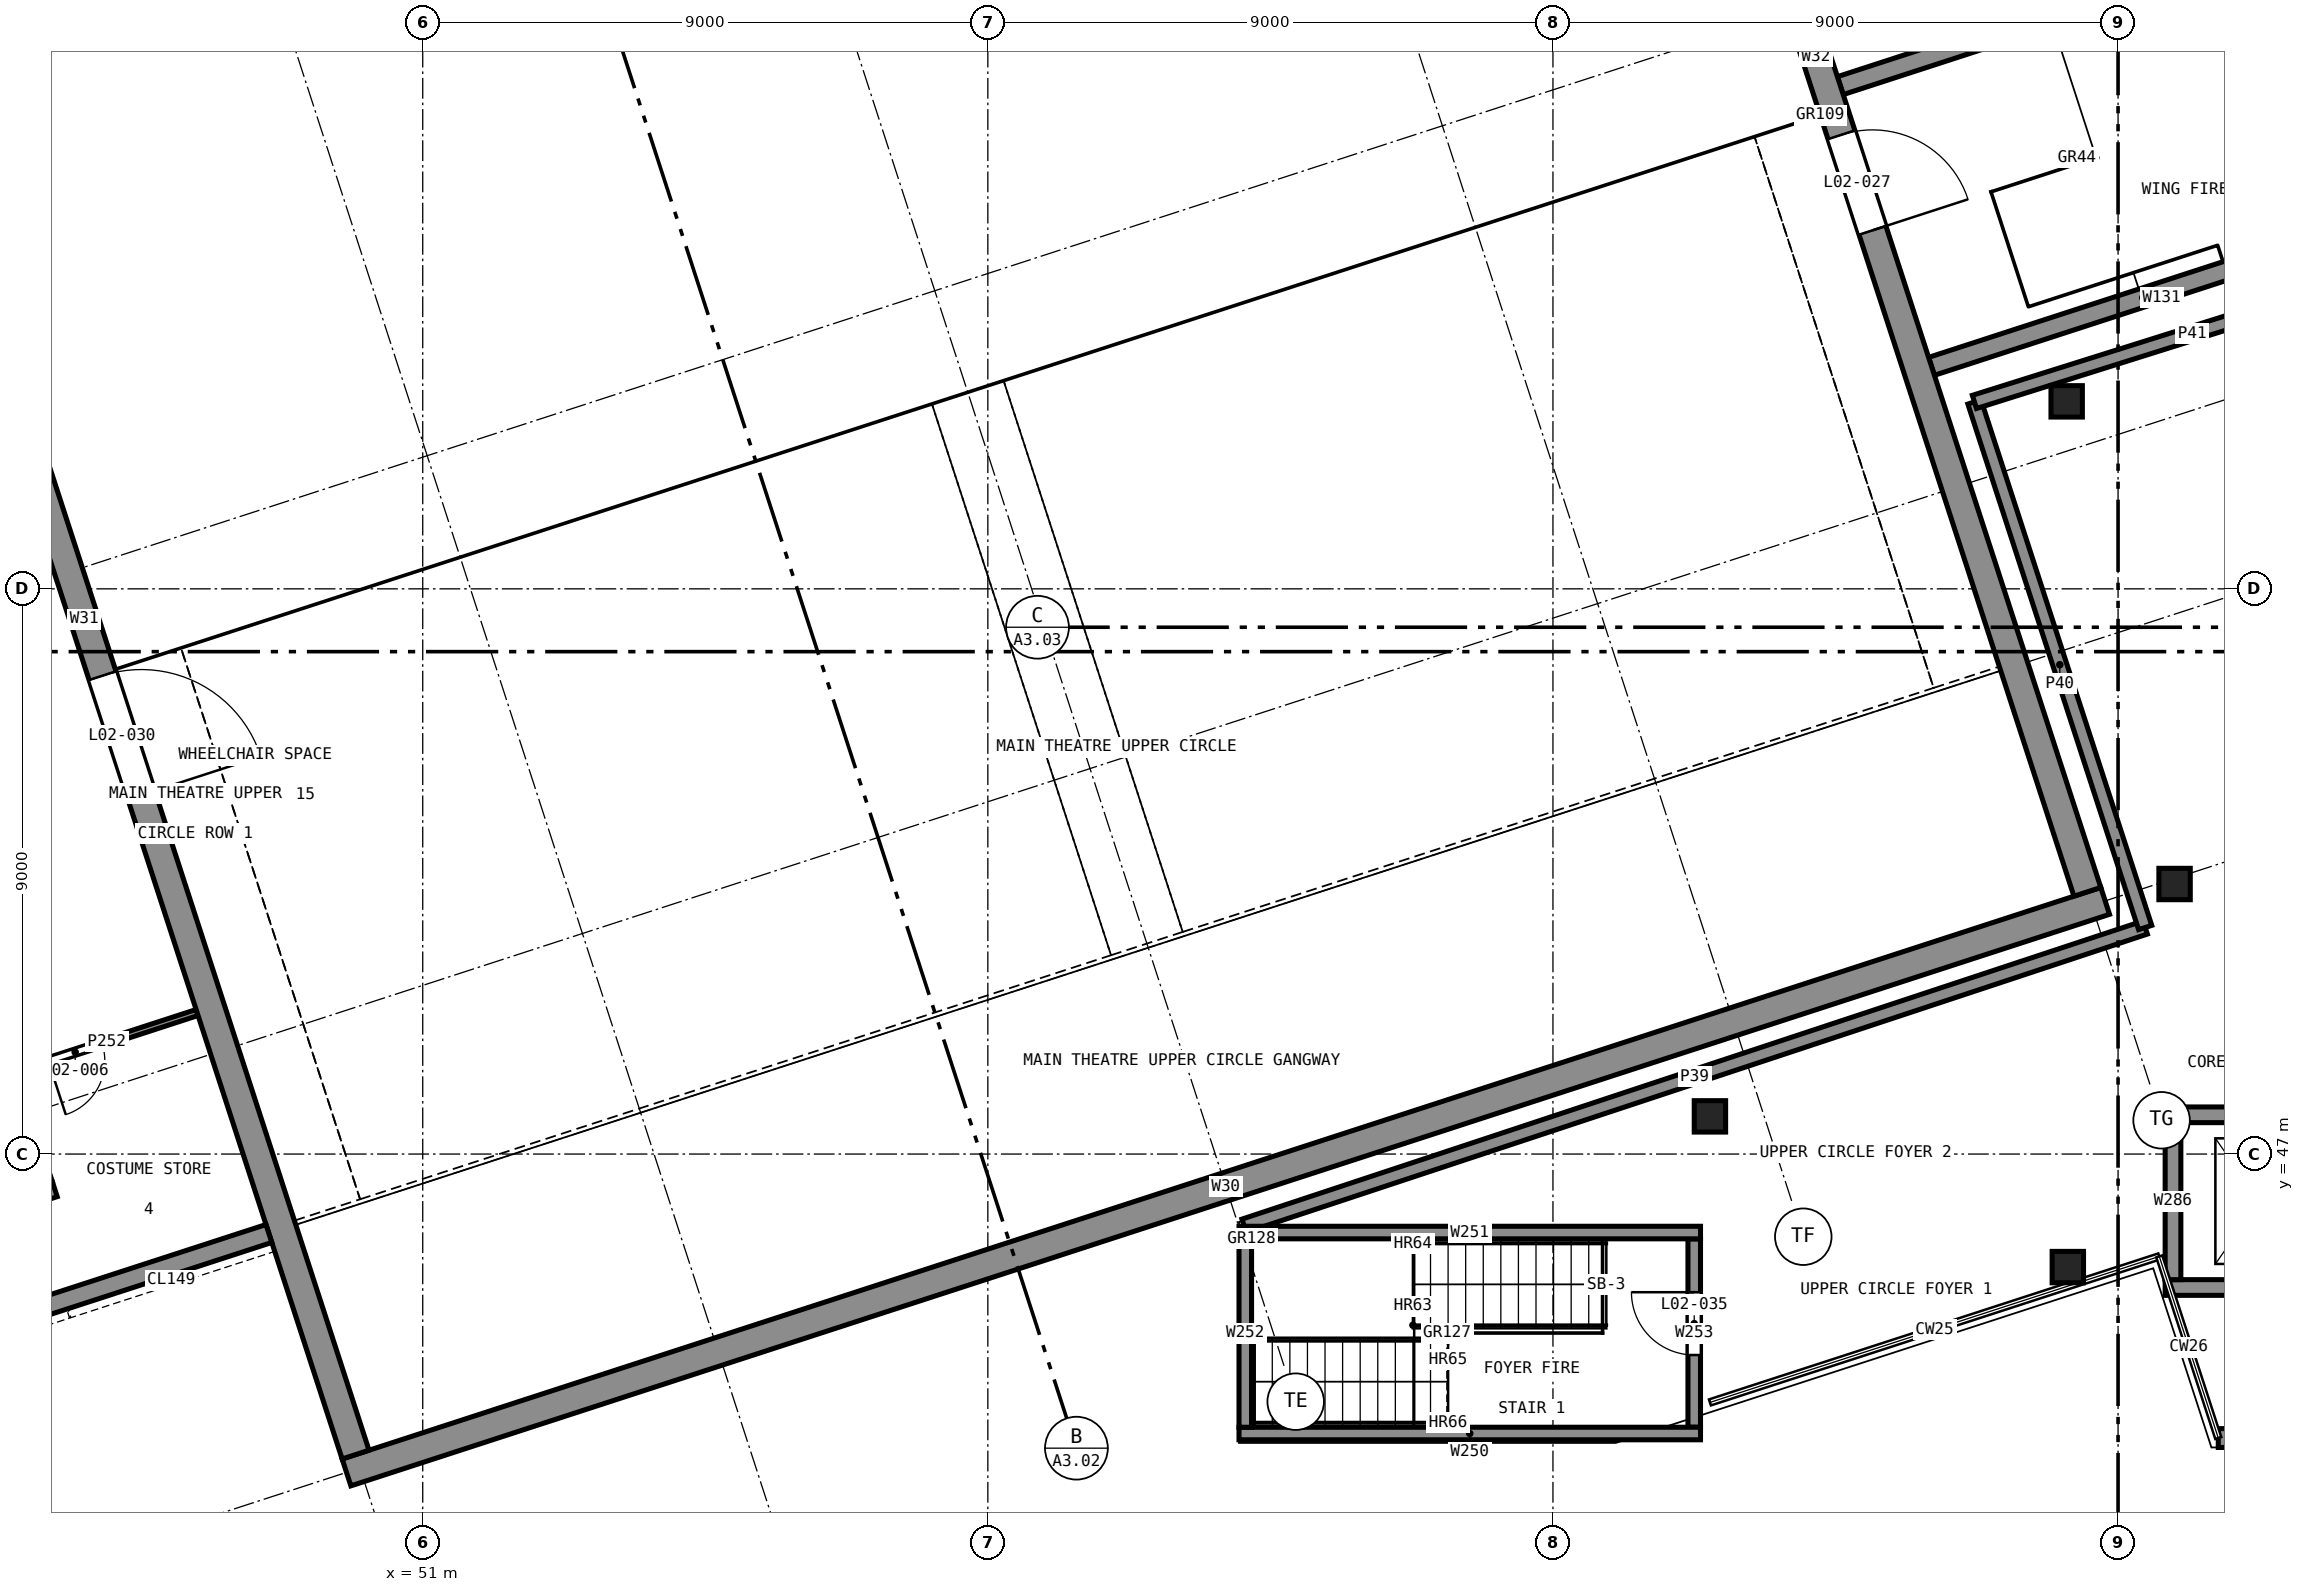
"""IFC4 building model, lengths in metres.
Left out: names, types, materials, properties, quantities, classifications, styles, units other than length and angle.
Written with IfcOpenShell. Run it as: python <this file> out.ifc"""

import sys

from ifc_helpers import new_model, si_unit, direction, frame, frame_2d, origin, origin_2d, place, context, subcontext, project, spatial, rectangle, extrude, element, fill, save


model = new_model("IFC4")
c1 = context("Model", 3, precision=1e-05, world=origin(), true_north=direction((0.0, 1.0)))
c2 = subcontext(c1, "Body", "Model", "MODEL_VIEW")
j1 = project(units=[si_unit("LENGTHUNIT", "METRE"), si_unit("PLANEANGLEUNIT", "RADIAN")], contexts=[c1])
p1 = place(None, origin())
s1 = spatial("IfcSite", under=j1, at=p1, CompositionType="ELEMENT")
p2 = place(p1, origin())
s2 = spatial("IfcBuilding", under=s1, at=p2, CompositionType="ELEMENT")
p3 = place(p2, frame((0.0, 0.0, 9.5)))
s3 = spatial("IfcBuildingStorey", under=s2, at=p3, CompositionType="ELEMENT", Elevation=9.5)
p4 = place(p3, frame((49.786, 41.93, 0.0), z_axis=(0.0, 0.0, 1.0), x_axis=(0.951055937194, 0.309018776661, 0.0)))
e1 = element("IfcWall", 1, at=p4, inside=s3, PredefinedType="SHEAR", context=c2, shape_type="SweptSolid", body=[
    extrude(rectangle(XDim=29.45, YDim=0.45, at=frame_2d((14.725, 0.0))), origin(), (0.0, 0.0, 1.0), 4.0),
])
p5 = place(p3, frame((49.93, 42.214, 0.0), z_axis=(0.0, 0.0, 1.0), x_axis=(-0.309016215614, 0.95105676933, 0.0)))
e2 = element("IfcWall", 2, at=p5, inside=s3, PredefinedType="SHEAR", context=c2, shape_type="SweptSolid", body=[
    extrude(rectangle(XDim=27.975, YDim=0.45, at=frame_2d((13.988, 0.0))), origin(), (0.0, 0.0, 1.0), 4.0),
])
p6 = place(p5, frame((11.042, 0.0, 0.0)))
e3 = element("IfcOpeningElement", 3, at=p6, cuts=e2, PredefinedType="OPENING", context=c2, shape_type="SweptSolid", body=[
    extrude(rectangle(XDim=2.0, YDim=2.4, at=frame_2d((1.0, 1.2))), frame((0.0, 0.235, 0.0), z_axis=(0.0, -1.0, 0.0), x_axis=(1.0, 0.0, 0.0)), (0.0, 0.0, 1.0), 0.47),
])
p7 = place(p3, frame((77.511, 51.176, 0.0), z_axis=(0.0, 0.0, 1.0), x_axis=(-0.309018780445, 0.951055935964, 0.0)))
e4 = element("IfcWall", 4, at=p7, inside=s3, PredefinedType="SHEAR", context=c2, shape_type="SweptSolid", body=[
    extrude(rectangle(XDim=27.975, YDim=0.45, at=frame_2d((13.987, 0.0))), origin(), (0.0, 0.0, 1.0), 4.0),
])
p8 = place(p7, frame((11.075, 0.0, 0.0)))
e5 = element("IfcOpeningElement", 5, at=p8, cuts=e4, PredefinedType="OPENING", context=c2, shape_type="SweptSolid", body=[
    extrude(rectangle(XDim=1.6, YDim=2.4, at=frame_2d((0.8, 1.2))), frame((0.0, 0.235, 0.0), z_axis=(0.0, -1.0, 0.0), x_axis=(1.0, 0.0, 0.0)), (0.0, 0.0, 1.0), 0.47),
])
p9 = place(p3, frame((48.55, 45.735, 0.0), z_axis=(0.0, 0.0, 1.0), x_axis=(-0.951061216338, -0.309002528757, 0.0)))
e6 = element("IfcWall", 6, at=p9, inside=s3, PredefinedType="SOLIDWALL", context=c2, shape_type="SweptSolid", body=[
    extrude(rectangle(XDim=15.925, YDim=0.3, at=frame_2d((7.962, 0.0))), origin(), (0.0, 0.0, 1.0), 4.0),
])
p10 = place(p3, frame((75.029, 59.543, 0.0), z_axis=(0.0, 0.0, 1.0), x_axis=(0.951057649576, 0.309013506475, 0.0)))
e7 = element("IfcWall", 7, at=p10, inside=s3, PredefinedType="SOLIDWALL", context=c2, shape_type="SweptSolid", body=[
    extrude(rectangle(XDim=7.075, YDim=0.3, at=frame_2d((3.538, 0.0))), origin(), (0.0, 0.0, 1.0), 3.7),
])
p11 = place(p3, frame((80.305, 66.199, 0.0), z_axis=(0.0, 0.0, 1.0), x_axis=(-0.951054354327, -0.309023648149, 0.0)))
e8 = element("IfcWall", 8, at=p11, inside=s3, PredefinedType="SOLIDWALL", context=c2, shape_type="SweptSolid", body=[
    extrude(rectangle(XDim=7.075, YDim=0.3, at=frame_2d((3.537, 0.0))), origin(), (0.0, 0.0, 1.0), 3.7),
])
p12 = place(p3, frame((42.382, 45.544, 0.0), z_axis=(0.0, 0.0, 1.0), x_axis=(0.951071801089, 0.308969948659, 0.0)))
e9 = element("IfcWall", 9, at=p12, inside=s3, PredefinedType="SHEAR", context=c2, shape_type="SweptSolid", body=[
    extrude(rectangle(XDim=2.9, YDim=0.25, at=frame_2d((1.45, 0.0))), origin(), (0.0, 0.0, 1.0), 4.0),
])
for number, where, z_axis, x_axis in (
    (10, (64.0, 42.55, 0.0), (0.0, 0.0, 1.0), (1.0, 0.0, 0.0)),
    (11, (71.35, 45.75, 0.0), (0.0, 0.0, 1.0), (-1.0, 0.0, 0.0)),
):
    element("IfcWall", number, at=place(p3, frame(where, z_axis=z_axis, x_axis=x_axis)), inside=s3, PredefinedType="SHEAR", context=c2, shape_type="SweptSolid", body=[
        extrude(rectangle(XDim=7.35, YDim=0.2, at=frame_2d((3.675, 0.0))), origin(), (0.0, 0.0, 1.0), 4.0),
    ])
p13 = place(p3, frame((64.1, 45.65, 0.0), z_axis=(0.0, 0.0, 1.0), x_axis=(0.0, -1.0, 0.0)))
e12 = element("IfcWall", 12, at=p13, inside=s3, PredefinedType="SHEAR", context=c2, shape_type="SweptSolid", body=[
    extrude(rectangle(XDim=3.0, YDim=0.2, at=frame_2d((1.5, 0.0))), origin(), (0.0, 0.0, 1.0), 4.0),
])
p14 = place(p3, frame((71.25, 42.65, 0.0), z_axis=(0.0, 0.0, 1.0), x_axis=(0.0, 1.0, 0.0)))
e13 = element("IfcWall", 13, at=p14, inside=s3, PredefinedType="SHEAR", context=c2, shape_type="SweptSolid", body=[
    extrude(rectangle(XDim=3.0, YDim=0.2, at=frame_2d((1.5, 0.0))), origin(), (0.0, 0.0, 1.0), 4.0),
])
p15 = place(p14, frame((1.15, 0.0, 0.0)))
e14 = element("IfcOpeningElement", 14, at=p15, cuts=e13, PredefinedType="OPENING", context=c2, shape_type="SweptSolid", body=[
    extrude(rectangle(XDim=1.0, YDim=2.1, at=frame_2d((0.5, 1.05))), frame((0.0, 0.11, 0.0), z_axis=(0.0, -1.0, 0.0), x_axis=(1.0, 0.0, 0.0)), (0.0, 0.0, 1.0), 0.22),
])
for number, where, z_axis, x_axis in (
    (15, (78.75, 44.875, 0.0), (0.0, 0.0, 1.0), (1.0, 0.0, 0.0)),
    (16, (81.75, 47.625, 0.0), (0.0, 0.0, 1.0), (-1.0, 0.0, 0.0)),
):
    element("IfcWall", number, at=place(p3, frame(where, z_axis=z_axis, x_axis=x_axis)), inside=s3, PredefinedType="SHEAR", context=c2, shape_type="SweptSolid", body=[
        extrude(rectangle(XDim=3.0, YDim=0.25, at=frame_2d((1.5, 0.0))), origin(), (0.0, 0.0, 1.0), 4.0),
    ])
p16 = place(p3, frame((78.875, 47.5, 0.0), z_axis=(0.0, 0.0, 1.0), x_axis=(0.0, -1.0, 0.0)))
e17 = element("IfcWall", 17, at=p16, inside=s3, PredefinedType="SHEAR", context=c2, shape_type="SweptSolid", body=[
    extrude(rectangle(XDim=2.5, YDim=0.25, at=frame_2d((1.25, 0.0))), origin(), (0.0, 0.0, 1.0), 4.0),
])
for number, where, z_axis, x_axis in (
    (18, (77.2, 45.2, 0.0), (0.0, 0.0, 1.0), (1.0, 0.0, 0.0)),
    (19, (71.5, 47.6, 0.0), (0.0, 0.0, 1.0), (1.0, 0.0, 0.0)),
    (20, (78.9, 51.3, 0.0), (0.0, 0.0, 1.0), (1.0, 0.0, 0.0)),
    (21, (77.182, 58.985, 0.0), (0.0, 0.0, 1.0), (1.0, 0.0, 0.0)),
):
    element("IfcColumn", number, at=place(p3, frame(where, z_axis=z_axis, x_axis=x_axis)), inside=s3, PredefinedType="COLUMN", context=c2, shape_type="SweptSolid", body=[
        extrude(rectangle(XDim=0.5, YDim=0.5, at=origin_2d()), origin(), (0.0, 0.0, 1.0), 4.0),
    ])
p17 = place(p3, frame((79.596, 42.478, 0.0), z_axis=(0.0, 0.0, 1.0), x_axis=(1.0, 0.0, 0.0)))
e22 = element("IfcWall", 22, at=p17, inside=s3, PredefinedType="SOLIDWALL", context=c2, shape_type="SweptSolid", body=[
    extrude(rectangle(XDim=2.941, YDim=0.3, at=frame_2d((1.471, 0.0))), origin(), (0.0, 0.0, 1.0), 3.7),
])
p18 = place(p3, frame((64.081, 45.859, 0.0), z_axis=(0.0, 0.0, 1.0), x_axis=(0.949388338269, 0.314104732786, 0.0)))
e23 = element("IfcWall", 23, at=p18, inside=s3, PredefinedType="SOLIDWALL", context=c2, shape_type="SweptSolid", body=[
    extrude(rectangle(XDim=15.116, YDim=0.22, at=frame_2d((7.558, 0.0))), origin(), (0.0, 0.0, 1.0), 3.7),
])
p19 = place(p3, frame((78.432, 50.607, 0.0), z_axis=(0.0, 0.0, 1.0), x_axis=(-0.309027731765, 0.951053027439, 0.0)))
e24 = element("IfcWall", 24, at=p19, inside=s3, PredefinedType="SOLIDWALL", context=c2, shape_type="SweptSolid", body=[
    extrude(rectangle(XDim=8.8, YDim=0.22, at=frame_2d((4.4, 0.0))), origin(), (0.0, 0.0, 1.0), 3.7),
])
p20 = place(p3, frame((75.712, 58.977, 0.0), z_axis=(0.0, 0.0, 1.0), x_axis=(0.954020604523, 0.299741031802, 0.0)))
e25 = element("IfcWall", 25, at=p20, inside=s3, PredefinedType="SOLIDWALL", context=c2, shape_type="SweptSolid", body=[
    extrude(rectangle(XDim=7.271, YDim=0.22, at=frame_2d((3.635, 0.0))), origin(), (0.0, 0.0, 1.0), 3.7),
])
p21 = place(p3, frame((44.53, 48.319, 0.0), z_axis=(0.0, 0.0, 1.0), x_axis=(0.951053046121, 0.30902767427, 0.0)))
e26 = element("IfcWall", 26, at=p21, inside=s3, PredefinedType="PARTITIONING", context=c2, shape_type="SweptSolid", body=[
    extrude(rectangle(XDim=3.025, YDim=0.1, at=frame_2d((1.512, 0.0))), origin(), (0.0, 0.0, 1.0), 3.7),
])
p22 = place(p21, frame((0.533, 0.0, 0.0)))
e27 = element("IfcOpeningElement", 27, at=p22, cuts=e26, PredefinedType="OPENING", context=c2, shape_type="SweptSolid", body=[
    extrude(rectangle(XDim=0.9, YDim=2.1, at=frame_2d((0.45, 1.05))), frame((0.0, 0.06, 0.0), z_axis=(0.0, -1.0, 0.0), x_axis=(1.0, 0.0, 0.0)), (0.0, 0.0, 1.0), 0.12),
])
p23 = place(p22, frame((0.9, 0.0, 0.0), z_axis=(0.0, 0.0, 1.0), x_axis=(-1.0, 0.0, 0.0)))
e28 = element("IfcDoor", 28, at=p23, inside=s3, OperationType="SINGLE_SWING_LEFT", PredefinedType="DOOR", context=c2, shape_type="SweptSolid", body=[
    extrude(rectangle(XDim=0.9, YDim=2.1, at=frame_2d((0.45, 1.05))), frame((0.0, 0.025, 0.0), z_axis=(0.0, -1.0, 0.0), x_axis=(1.0, 0.0, 0.0)), (0.0, 0.0, 1.0), 0.05),
])
fill(e27, e28)
p24 = place(p8, frame((1.6, 0.0, 0.0), z_axis=(0.0, 0.0, 1.0), x_axis=(-1.0, 0.0, 0.0)))
e29 = element("IfcDoor", 29, at=p24, inside=s3, OperationType="DOUBLE_DOOR_SINGLE_SWING", PredefinedType="DOOR", context=c2, shape_type="SweptSolid", body=[
    extrude(rectangle(XDim=1.6, YDim=2.4, at=frame_2d((0.8, 1.2))), frame((0.0, 0.025, 0.0), z_axis=(0.0, -1.0, 0.0), x_axis=(1.0, 0.0, 0.0)), (0.0, 0.0, 1.0), 0.05),
])
fill(e5, e29)
p25 = place(p6, frame((2.0, 0.0, 0.0), z_axis=(0.0, 0.0, 1.0), x_axis=(-1.0, 0.0, 0.0)))
e30 = element("IfcDoor", 30, at=p25, inside=s3, OperationType="DOUBLE_DOOR_SINGLE_SWING", PredefinedType="DOOR", context=c2, shape_type="SweptSolid", body=[
    extrude(rectangle(XDim=2.0, YDim=2.4, at=frame_2d((1.0, 1.2))), frame((0.0, 0.025, 0.0), z_axis=(0.0, -1.0, 0.0), x_axis=(1.0, 0.0, 0.0)), (0.0, 0.0, 1.0), 0.05),
])
fill(e3, e30)
p26 = place(p15, origin())
e31 = element("IfcDoor", 31, at=p26, inside=s3, OperationType="SINGLE_SWING_LEFT", PredefinedType="DOOR", context=c2, shape_type="SweptSolid", body=[
    extrude(rectangle(XDim=1.0, YDim=2.1, at=frame_2d((0.5, 1.05))), frame((0.0, 0.025, 0.0), z_axis=(0.0, -1.0, 0.0), x_axis=(1.0, 0.0, 0.0)), (0.0, 0.0, 1.0), 0.05),
])
fill(e14, e31)
save(model, sys.argv[1])
